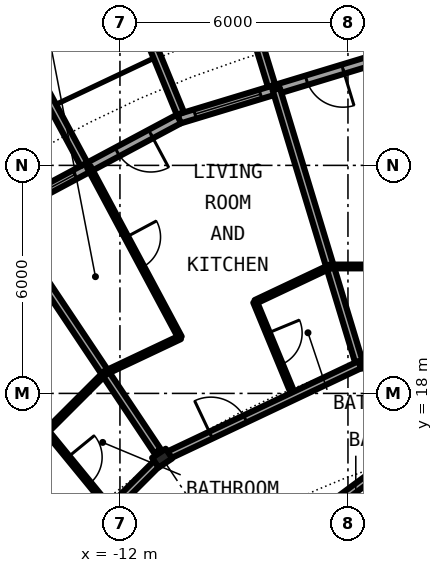
"""IFC4 building model, lengths in metres.
Left out: names, types, materials, properties, quantities, classifications, styles, units other than length and angle.
Written with IfcOpenShell. Run it as: python <this file> out.ifc"""

import sys

from ifc_helpers import new_model, si_unit, direction, frame, frame_2d, origin, origin_2d, place, context, subcontext, project, spatial, rectangle, i_section, extrude, element, fill, save


model = new_model("IFC4")
c1 = context("Model", 3, precision=1e-05, world=origin(), true_north=direction((0.0, 1.0)))
c2 = subcontext(c1, "Body", "Model", "MODEL_VIEW")
j1 = project(units=[si_unit("LENGTHUNIT", "METRE"), si_unit("PLANEANGLEUNIT", "RADIAN")], contexts=[c1])
p1 = place(None, origin())
s1 = spatial("IfcSite", under=j1, at=p1, CompositionType="ELEMENT")
p2 = place(p1, origin())
s2 = spatial("IfcBuilding", under=s1, at=p2, CompositionType="ELEMENT")
p3 = place(p2, frame((0.0, 0.0, 120.8)))
s3 = spatial("IfcBuildingStorey", under=s2, at=p3, CompositionType="ELEMENT", Elevation=120.8)
p4 = place(p3, frame((-10.889, 16.297, 0.0), z_axis=(0.0, 0.0, 1.0), x_axis=(-0.55557023302, 0.831469612303, 0.0)))
e1 = element("IfcColumn", 1, at=p4, inside=s3, PredefinedType="COLUMN", context=c2, shape_type="SweptSolid", body=[
    extrude(i_section(OverallWidth=0.307, OverallDepth=0.432, WebThickness=0.021, FlangeThickness=0.04, FilletRadius=0.027, at=origin_2d()), origin(), (0.0, 0.0, 1.0), 3.05),
])
p5 = place(p3, frame((-5.326, 26.775, 0.0), z_axis=(0.0, 0.0, 1.0), x_axis=(-0.956965678721, -0.290201119486, 0.0)))
e2 = element("IfcWall", 2, at=p5, inside=s3, PredefinedType="SOLIDWALL", context=c2, shape_type="SweptSolid", body=[
    extrude(rectangle(XDim=5.351, YDim=0.25, at=frame_2d((2.676, 0.0))), origin(), (0.0, 0.0, 1.0), 2.7),
])
p6 = place(p5, frame((0.841, 0.0, 0.0)))
e3 = element("IfcOpeningElement", 3, at=p6, cuts=e2, PredefinedType="OPENING", context=c2, shape_type="SweptSolid", body=[
    extrude(rectangle(XDim=1.0, YDim=2.2, at=frame_2d((0.5, 1.1))), frame((0.0, 0.135, 0.0), z_axis=(0.0, -1.0, 0.0), x_axis=(1.0, 0.0, 0.0)), (0.0, 0.0, 1.0), 0.27),
])
p7 = place(p5, frame((3.111, 0.0, 0.3)))
e4 = element("IfcOpeningElement", 4, at=p7, cuts=e2, PredefinedType="OPENING", context=c2, shape_type="SweptSolid", body=[
    extrude(rectangle(XDim=1.8, YDim=2.1, at=frame_2d((0.9, 1.05))), frame((0.0, 0.135, 0.0), z_axis=(0.0, -1.0, 0.0), x_axis=(1.0, 0.0, 0.0)), (0.0, 0.0, 1.0), 0.27),
])
p8 = place(p3, frame((-8.009, 26.092, -0.03), z_axis=(0.0, 0.0, 1.0), x_axis=(-0.293406695073, 0.955987715029, 0.0)))
e5 = element("IfcWall", 5, at=p8, inside=s3, PredefinedType="SOLIDWALL", context=c2, shape_type="SweptSolid", body=[
    extrude(rectangle(XDim=3.006, YDim=0.2, at=frame_2d((1.503, 0.0))), origin(), (0.0, 0.0, 1.0), 2.73),
])
p9 = place(p3, frame((-10.409, 25.364, -0.03), z_axis=(0.0, 0.0, 1.0), x_axis=(-0.379509886562, 0.925187681501, 0.0)))
e6 = element("IfcWall", 6, at=p9, inside=s3, PredefinedType="SOLIDWALL", context=c2, shape_type="SweptSolid", body=[
    extrude(rectangle(XDim=2.883, YDim=0.2, at=frame_2d((1.441, 0.0))), origin(), (0.0, 0.0, 1.0), 2.73),
])
p10 = place(p3, frame((-10.447, 25.222, 0.0), z_axis=(0.0, 0.0, 1.0), x_axis=(-0.881915646801, -0.471407246368, 0.0)))
e7 = element("IfcWall", 7, at=p10, inside=s3, PredefinedType="SOLIDWALL", context=c2, shape_type="SweptSolid", body=[
    extrude(rectangle(XDim=5.352, YDim=0.25, at=frame_2d((2.676, 0.0))), origin(), (0.0, 0.0, 1.0), 2.7),
])
p11 = place(p10, frame((0.841, 0.0, 0.0)))
e8 = element("IfcOpeningElement", 8, at=p11, cuts=e7, PredefinedType="OPENING", context=c2, shape_type="SweptSolid", body=[
    extrude(rectangle(XDim=1.0, YDim=2.2, at=frame_2d((0.5, 1.1))), frame((0.0, 0.135, 0.0), z_axis=(0.0, -1.0, 0.0), x_axis=(1.0, 0.0, 0.0)), (0.0, 0.0, 1.0), 0.27),
])
p12 = place(p10, frame((3.111, 0.0, 0.3)))
e9 = element("IfcOpeningElement", 9, at=p12, cuts=e7, PredefinedType="OPENING", context=c2, shape_type="SweptSolid", body=[
    extrude(rectangle(XDim=1.8, YDim=2.1, at=frame_2d((0.9, 1.05))), frame((0.0, 0.135, 0.0), z_axis=(0.0, -1.0, 0.0), x_axis=(1.0, 0.0, 0.0)), (0.0, 0.0, 1.0), 0.27),
])
p13 = place(p3, frame((-12.945, 24.029, -0.03), z_axis=(0.0, 0.0, 1.0), x_axis=(-0.474424310775, 0.88029629861, 0.0)))
e10 = element("IfcWall", 10, at=p13, inside=s3, PredefinedType="SOLIDWALL", context=c2, shape_type="SweptSolid", body=[
    extrude(rectangle(XDim=3.006, YDim=0.2, at=frame_2d((1.503, 0.0))), origin(), (0.0, 0.0, 1.0), 2.73),
])
p14 = place(p3, frame((-7.887, 26.005, 0.0), z_axis=(0.0, 0.0, 1.0), x_axis=(0.29005838641, -0.957008951094, 0.0)))
e11 = element("IfcWall", 11, at=p14, inside=s3, PredefinedType="PARTITIONING", context=c2, shape_type="SweptSolid", body=[
    extrude(rectangle(XDim=7.574, YDim=0.2, at=frame_2d((3.787, 0.0))), origin(), (0.0, 0.0, 1.0), 2.7),
])
p15 = place(p3, frame((-15.097, 22.595, 0.0), z_axis=(0.0, 0.0, 1.0), x_axis=(0.555572791, -0.831467903109, 0.0)))
e12 = element("IfcWall", 12, at=p15, inside=s3, PredefinedType="PARTITIONING", context=c2, shape_type="SweptSolid", body=[
    extrude(rectangle(XDim=7.358, YDim=0.2, at=frame_2d((3.679, 0.0))), origin(), (0.0, 0.0, 1.0), 2.7),
])
p16 = place(p3, frame((-13.927, 17.004, 0.0), z_axis=(0.0, 0.0, 1.0), x_axis=(0.633582447834, -0.77367517848, 0.0)))
e13 = element("IfcWall", 13, at=p16, inside=s3, PredefinedType="PARTITIONING", context=c2, shape_type="SweptSolid", body=[
    extrude(rectangle(XDim=2.661, YDim=0.1, at=frame_2d((1.331, 0.0))), origin(), (0.0, 0.0, 1.0), 2.7),
])
p17 = place(p16, frame((0.881, 0.0, 0.0)))
e14 = element("IfcOpeningElement", 14, at=p17, cuts=e13, PredefinedType="OPENING", context=c2, shape_type="SweptSolid", body=[
    extrude(rectangle(XDim=0.9, YDim=2.3, at=frame_2d((0.45, 1.15))), frame((0.0, 0.06, 0.0), z_axis=(0.0, -1.0, 0.0), x_axis=(1.0, 0.0, 0.0)), (0.0, 0.0, 1.0), 0.12),
])
p18 = place(p3, frame((-12.82, 23.961, 0.0), z_axis=(0.0, 0.0, 1.0), x_axis=(0.471735511233, -0.881740101981, 0.0)))
e15 = element("IfcWall", 15, at=p18, inside=s3, PredefinedType="PARTITIONING", context=c2, shape_type="SweptSolid", body=[
    extrude(rectangle(XDim=5.09, YDim=0.1, at=frame_2d((2.545, 0.0))), origin(), (0.0, 0.0, 1.0), 2.7),
])
p19 = place(p18, frame((2.095, 0.0, 0.0)))
e16 = element("IfcOpeningElement", 16, at=p19, cuts=e15, PredefinedType="OPENING", context=c2, shape_type="SweptSolid", body=[
    extrude(rectangle(XDim=0.9, YDim=2.3, at=frame_2d((0.45, 1.15))), frame((0.0, 0.06, 0.0), z_axis=(0.0, -1.0, 0.0), x_axis=(1.0, 0.0, 0.0)), (0.0, 0.0, 1.0), 0.12),
])
p20 = place(p3, frame((-8.445, 20.407, 0.0), z_axis=(0.0, 0.0, 1.0), x_axis=(0.382195876364, -0.924081334132, 0.0)))
e17 = element("IfcWall", 17, at=p20, inside=s3, PredefinedType="PARTITIONING", context=c2, shape_type="SweptSolid", body=[
    extrude(rectangle(XDim=2.674, YDim=0.1, at=frame_2d((1.337, 0.0))), origin(), (0.0, 0.0, 1.0), 2.7),
])
p21 = place(p20, frame((0.887, 0.0, 0.0)))
e18 = element("IfcOpeningElement", 18, at=p21, cuts=e17, PredefinedType="OPENING", context=c2, shape_type="SweptSolid", body=[
    extrude(rectangle(XDim=0.9, YDim=2.3, at=frame_2d((0.45, 1.15))), frame((0.0, 0.06, 0.0), z_axis=(0.0, -1.0, 0.0), x_axis=(1.0, 0.0, 0.0)), (0.0, 0.0, 1.0), 0.12),
])
p22 = place(p3, frame((-14.052, 9.389, 0.0), z_axis=(0.0, 0.0, 1.0), x_axis=(0.803204584823, 0.59570327758, 0.0)))
e19 = element("IfcWall", 19, at=p22, inside=s3, PredefinedType="PARTITIONING", context=c2, shape_type="SweptSolid", body=[
    extrude(rectangle(XDim=11.387, YDim=0.2, at=frame_2d((5.693, 0.0))), origin(), (0.0, 0.0, 1.0), 2.7),
])
p23 = place(p22, frame((6.007, 0.0, 0.0)))
e20 = element("IfcOpeningElement", 20, at=p23, cuts=e19, PredefinedType="OPENING", context=c2, shape_type="SweptSolid", body=[
    extrude(rectangle(XDim=1.0, YDim=2.3, at=frame_2d((0.5, 1.15))), frame((0.0, 0.11, 0.0), z_axis=(0.0, -1.0, 0.0), x_axis=(1.0, 0.0, 0.0)), (0.0, 0.0, 1.0), 0.22),
])
p24 = place(p3, frame((-5.69, 18.756, 0.0), z_axis=(0.0, 0.0, 1.0), x_axis=(1.0, 0.0, 0.0)))
e21 = element("IfcWall", 21, at=p24, inside=s3, PredefinedType="PARTITIONING", context=c2, shape_type="SweptSolid", body=[
    extrude(rectangle(XDim=11.38, YDim=0.2, at=frame_2d((5.69, 0.0))), origin(), (0.0, 0.0, 1.0), 2.7),
])
p25 = place(p24, frame((3.294, 0.0, 0.0)))
e22 = element("IfcOpeningElement", 22, at=p25, cuts=e21, PredefinedType="OPENING", context=c2, shape_type="SweptSolid", body=[
    extrude(rectangle(XDim=1.0, YDim=2.3, at=frame_2d((0.5, 1.15))), frame((0.0, 0.11, 0.0), z_axis=(0.0, -1.0, 0.0), x_axis=(1.0, 0.0, 0.0)), (0.0, 0.0, 1.0), 0.22),
])
p26 = place(p3, frame((-16.186, 11.0, 0.0), z_axis=(0.0, 0.0, 1.0), x_axis=(0.707106781187, 0.707106781187, 0.0)))
e23 = element("IfcWall", 23, at=p26, inside=s3, PredefinedType="PARTITIONING", context=c2, shape_type="SweptSolid", body=[
    extrude(rectangle(XDim=7.334, YDim=0.2, at=frame_2d((3.667, 0.0))), origin(), (0.0, 0.0, 1.0), 2.39),
])
p27 = place(p26, frame((2.211, 0.0, 0.0)))
e24 = element("IfcOpeningElement", 24, at=p27, cuts=e23, PredefinedType="OPENING", context=c2, shape_type="SweptSolid", body=[
    extrude(rectangle(XDim=1.0, YDim=2.3, at=frame_2d((0.5, 1.15))), frame((0.0, 0.11, 0.0), z_axis=(0.0, -1.0, 0.0), x_axis=(1.0, 0.0, 0.0)), (0.0, 0.0, 1.0), 0.22),
])
p28 = place(p3, frame((-10.748, 16.362, 0.0), z_axis=(0.0, 0.0, 1.0), x_axis=(0.903869270233, 0.427808768409, 0.0)))
e25 = element("IfcWall", 25, at=p28, inside=s3, PredefinedType="PARTITIONING", context=c2, shape_type="SweptSolid", body=[
    extrude(rectangle(XDim=5.596, YDim=0.2, at=frame_2d((2.798, 0.0))), origin(), (0.0, 0.0, 1.0), 2.39),
])
p29 = place(p28, frame((1.262, 0.0, 0.0)))
e26 = element("IfcOpeningElement", 26, at=p29, cuts=e25, PredefinedType="OPENING", context=c2, shape_type="SweptSolid", body=[
    extrude(rectangle(XDim=1.0, YDim=2.3, at=frame_2d((0.5, 1.15))), frame((0.0, 0.11, 0.0), z_axis=(0.0, -1.0, 0.0), x_axis=(1.0, 0.0, 0.0)), (0.0, 0.0, 1.0), 0.22),
])
p30 = place(p3, frame((-6.473, 21.34, 0.0), z_axis=(0.0, 0.0, 1.0), x_axis=(1.0, 0.0, 0.0)))
e27 = element("IfcWall", 27, at=p30, inside=s3, PredefinedType="PARTITIONING", context=c2, shape_type="SweptSolid", body=[
    extrude(rectangle(XDim=2.157, YDim=0.1, at=frame_2d((1.079, 0.0))), origin(), (0.0, 0.0, 1.0), 2.7),
])
p31 = place(p3, frame((-13.924, 17.006, 0.0), z_axis=(0.0, 0.0, 1.0), x_axis=(0.707387256653, 0.706826194425, 0.0)))
e28 = element("IfcWall", 28, at=p31, inside=s3, PredefinedType="PARTITIONING", context=c2, shape_type="SweptSolid", body=[
    extrude(rectangle(XDim=2.176, YDim=0.1, at=frame_2d((1.088, 0.0))), origin(), (0.0, 0.0, 1.0), 2.7),
])
for number, where, z_axis, x_axis in (
    (29, (-12.389, 18.542, 0.0), (0.0, 0.0, 1.0), (0.904, 0.427, 0.0)),
    (30, (-8.436, 20.41, 0.0), (0.0, 0.0, 1.0), (0.904, 0.427, 0.0)),
):
    element("IfcWall", number, at=place(p3, frame(where, z_axis=z_axis, x_axis=x_axis)), inside=s3, PredefinedType="PARTITIONING", context=c2, shape_type="SweptSolid", body=[
        extrude(rectangle(XDim=2.181, YDim=0.1, at=frame_2d((1.091, 0.0))), origin(), (0.0, 0.0, 1.0), 2.7),
    ])
p32 = place(p6, origin())
e31 = element("IfcDoor", 31, at=p32, inside=s3, OperationType="SINGLE_SWING_LEFT", PredefinedType="DOOR", context=c2, shape_type="SweptSolid", body=[
    extrude(rectangle(XDim=1.0, YDim=2.2, at=frame_2d((0.5, 1.1))), frame((0.0, 0.025, 0.0), z_axis=(0.0, -1.0, 0.0), x_axis=(1.0, 0.0, 0.0)), (0.0, 0.0, 1.0), 0.05),
])
fill(e3, e31)
p33 = place(p7, origin())
e32 = element("IfcWindow", 32, at=p33, inside=s3, PartitioningType="SINGLE_PANEL", PredefinedType="WINDOW", context=c2, shape_type="SweptSolid", body=[
    extrude(rectangle(XDim=1.8, YDim=2.1, at=frame_2d((0.9, 1.05))), frame((0.0, 0.03, 0.0), z_axis=(0.0, -1.0, 0.0), x_axis=(1.0, 0.0, 0.0)), (0.0, 0.0, 1.0), 0.06),
])
fill(e4, e32)
p34 = place(p11, origin())
e33 = element("IfcDoor", 33, at=p34, inside=s3, OperationType="SINGLE_SWING_LEFT", PredefinedType="DOOR", context=c2, shape_type="SweptSolid", body=[
    extrude(rectangle(XDim=1.0, YDim=2.2, at=frame_2d((0.5, 1.1))), frame((0.0, 0.025, 0.0), z_axis=(0.0, -1.0, 0.0), x_axis=(1.0, 0.0, 0.0)), (0.0, 0.0, 1.0), 0.05),
])
fill(e8, e33)
p35 = place(p12, origin())
e34 = element("IfcWindow", 34, at=p35, inside=s3, PartitioningType="SINGLE_PANEL", PredefinedType="WINDOW", context=c2, shape_type="SweptSolid", body=[
    extrude(rectangle(XDim=1.8, YDim=2.1, at=frame_2d((0.9, 1.05))), frame((0.0, 0.03, 0.0), z_axis=(0.0, -1.0, 0.0), x_axis=(1.0, 0.0, 0.0)), (0.0, 0.0, 1.0), 0.06),
])
fill(e9, e34)
p36 = place(p29, origin())
e35 = element("IfcDoor", 35, at=p36, inside=s3, OperationType="SINGLE_SWING_LEFT", PredefinedType="DOOR", context=c2, shape_type="SweptSolid", body=[
    extrude(rectangle(XDim=1.0, YDim=2.3, at=frame_2d((0.5, 1.15))), frame((0.0, 0.025, 0.0), z_axis=(0.0, -1.0, 0.0), x_axis=(1.0, 0.0, 0.0)), (0.0, 0.0, 1.0), 0.05),
])
fill(e26, e35)
p37 = place(p21, origin())
e36 = element("IfcDoor", 36, at=p37, inside=s3, OperationType="SINGLE_SWING_RIGHT", PredefinedType="DOOR", context=c2, shape_type="SweptSolid", body=[
    extrude(rectangle(XDim=0.9, YDim=2.3, at=frame_2d((0.45, 1.15))), frame((0.0, 0.025, 0.0), z_axis=(0.0, -1.0, 0.0), x_axis=(1.0, 0.0, 0.0)), (0.0, 0.0, 1.0), 0.05),
])
fill(e18, e36)
p38 = place(p19, origin())
e37 = element("IfcDoor", 37, at=p38, inside=s3, OperationType="SINGLE_SWING_RIGHT", PredefinedType="DOOR", context=c2, shape_type="SweptSolid", body=[
    extrude(rectangle(XDim=0.9, YDim=2.3, at=frame_2d((0.45, 1.15))), frame((0.0, 0.025, 0.0), z_axis=(0.0, -1.0, 0.0), x_axis=(1.0, 0.0, 0.0)), (0.0, 0.0, 1.0), 0.05),
])
fill(e16, e37)
p39 = place(p17, origin())
e38 = element("IfcDoor", 38, at=p39, inside=s3, OperationType="SINGLE_SWING_RIGHT", PredefinedType="DOOR", context=c2, shape_type="SweptSolid", body=[
    extrude(rectangle(XDim=0.9, YDim=2.3, at=frame_2d((0.45, 1.15))), frame((0.0, 0.025, 0.0), z_axis=(0.0, -1.0, 0.0), x_axis=(1.0, 0.0, 0.0)), (0.0, 0.0, 1.0), 0.05),
])
fill(e14, e38)
save(model, sys.argv[1])
